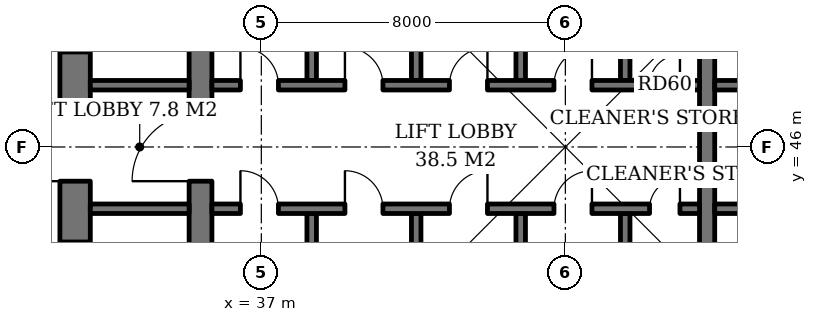
"""IFC4 building model, lengths in metres.
Left out: names, types, materials, properties, quantities, classifications, styles, units other than length and angle.
Written with IfcOpenShell. Run it as: python <this file> out.ifc"""

import sys

from ifc_helpers import new_model, si_unit, direction, frame, frame_2d, origin, place, context, subcontext, project, spatial, rectangle, extrude, element, fill, save


model = new_model("IFC4")
c1 = context("Model", 3, precision=1e-05, world=origin(), true_north=direction((0.0, 1.0)))
c2 = subcontext(c1, "Body", "Model", "MODEL_VIEW")
j1 = project(units=[si_unit("LENGTHUNIT", "METRE"), si_unit("PLANEANGLEUNIT", "RADIAN")], contexts=[c1])
p1 = place(None, origin())
s1 = spatial("IfcSite", under=j1, at=p1, CompositionType="ELEMENT")
p2 = place(p1, origin())
s2 = spatial("IfcBuilding", under=s1, at=p2, CompositionType="ELEMENT")
p3 = place(p2, frame((0.0, 0.0, -10.0)))
s3 = spatial("IfcBuildingStorey", under=s2, at=p3, CompositionType="ELEMENT", Elevation=-10.0)
p4 = place(p3, frame((35.4, 36.7, 0.0), z_axis=(0.0, 0.0, 1.0), x_axis=(0.0, 1.0, 0.0)))
e1 = element("IfcWall", 1, at=p4, inside=s3, PredefinedType="SHEAR", context=c2, shape_type="SweptSolid", body=[
    extrude(rectangle(XDim=18.6, YDim=0.6, at=frame_2d((9.3, 0.0))), origin(), (0.0, 0.0, 1.0), 5.0),
])
p5 = place(p4, frame((8.4, 0.0, 0.0)))
e2 = element("IfcOpeningElement", 2, at=p5, cuts=e1, PredefinedType="OPENING", context=c2, shape_type="SweptSolid", body=[
    extrude(rectangle(XDim=1.8, YDim=2.4, at=frame_2d((0.9, 1.2))), frame((0.0, 0.31, 0.0), z_axis=(0.0, -1.0, 0.0), x_axis=(1.0, 0.0, 0.0)), (0.0, 0.0, 1.0), 0.62),
])
p6 = place(p3, frame((32.1, 33.5, 0.0), z_axis=(0.0, 0.0, 1.0), x_axis=(0.0, 1.0, 0.0)))
e3 = element("IfcWall", 3, at=p6, inside=s3, PredefinedType="SHEAR", context=c2, shape_type="SweptSolid", body=[
    extrude(rectangle(XDim=25.0, YDim=0.8, at=frame_2d((12.5, 0.0))), origin(), (0.0, 0.0, 1.0), 5.0),
])
p7 = place(p6, frame((11.6, 0.0, 0.0)))
e4 = element("IfcOpeningElement", 4, at=p7, cuts=e3, PredefinedType="OPENING", context=c2, shape_type="SweptSolid", body=[
    extrude(rectangle(XDim=1.8, YDim=2.4, at=frame_2d((0.9, 1.2))), frame((0.0, 0.41, 0.0), z_axis=(0.0, -1.0, 0.0), x_axis=(1.0, 0.0, 0.0)), (0.0, 0.0, 1.0), 0.82),
])
p8 = place(p6, frame((3.5, 0.0, 0.0)))
e5 = element("IfcOpeningElement", 5, at=p8, cuts=e3, PredefinedType="OPENING", context=c2, shape_type="SweptSolid", body=[
    extrude(rectangle(XDim=1.0, YDim=2.1, at=frame_2d((0.5, 1.05))), frame((0.0, 0.41, 0.0), z_axis=(0.0, -1.0, 0.0), x_axis=(1.0, 0.0, 0.0)), (0.0, 0.0, 1.0), 0.82),
])
p9 = place(p6, frame((6.25, 0.0, 0.0)))
e6 = element("IfcOpeningElement", 6, at=p9, cuts=e3, PredefinedType="OPENING", context=c2, shape_type="SweptSolid", body=[
    extrude(rectangle(XDim=1.0, YDim=2.1, at=frame_2d((0.5, 1.05))), frame((0.0, 0.41, 0.0), z_axis=(0.0, -1.0, 0.0), x_axis=(1.0, 0.0, 0.0)), (0.0, 0.0, 1.0), 0.82),
])
p10 = place(p6, frame((9.0, 0.0, 0.0)))
e7 = element("IfcOpeningElement", 7, at=p10, cuts=e3, PredefinedType="OPENING", context=c2, shape_type="SweptSolid", body=[
    extrude(rectangle(XDim=1.0, YDim=2.1, at=frame_2d((0.5, 1.05))), frame((0.0, 0.41, 0.0), z_axis=(0.0, -1.0, 0.0), x_axis=(1.0, 0.0, 0.0)), (0.0, 0.0, 1.0), 0.82),
])
p11 = place(p6, frame((15.0, 0.0, 0.0)))
e8 = element("IfcOpeningElement", 8, at=p11, cuts=e3, PredefinedType="OPENING", context=c2, shape_type="SweptSolid", body=[
    extrude(rectangle(XDim=1.0, YDim=2.1, at=frame_2d((0.5, 1.05))), frame((0.0, 0.41, 0.0), z_axis=(0.0, -1.0, 0.0), x_axis=(1.0, 0.0, 0.0)), (0.0, 0.0, 1.0), 0.82),
])
p12 = place(p6, frame((17.75, 0.0, 0.0)))
e9 = element("IfcOpeningElement", 9, at=p12, cuts=e3, PredefinedType="OPENING", context=c2, shape_type="SweptSolid", body=[
    extrude(rectangle(XDim=1.0, YDim=2.1, at=frame_2d((0.5, 1.05))), frame((0.0, 0.41, 0.0), z_axis=(0.0, -1.0, 0.0), x_axis=(1.0, 0.0, 0.0)), (0.0, 0.0, 1.0), 0.82),
])
p13 = place(p3, frame((48.73, 40.0, 0.0), z_axis=(0.0, 0.0, 1.0), x_axis=(0.0, 1.0, 0.0)))
e10 = element("IfcWall", 10, at=p13, inside=s3, PredefinedType="SHEAR", context=c2, shape_type="SweptSolid", body=[
    extrude(rectangle(XDim=12.0, YDim=0.4, at=frame_2d((6.0, 0.0))), origin(), (0.0, 0.0, 1.0), 5.0),
])
for number, where, z_axis, x_axis in (
    (11, (38.325, 47.75, 0.0), (0.0, 0.0, 1.0), (0.0, 1.0, 0.0)),
    (12, (41.075, 47.75, 0.0), (0.0, 0.0, 1.0), (0.0, 1.0, 0.0)),
    (13, (43.825, 47.75, 0.0), (0.0, 0.0, 1.0), (0.0, 1.0, 0.0)),
    (14, (46.575, 47.75, 0.0), (0.0, 0.0, 1.0), (0.0, 1.0, 0.0)),
):
    element("IfcWall", number, at=place(p3, frame(where, z_axis=z_axis, x_axis=x_axis)), inside=s3, PredefinedType="SHEAR", context=c2, shape_type="SweptSolid", body=[
        extrude(rectangle(XDim=2.6, YDim=0.25, at=frame_2d((1.3, 0.0))), origin(), (0.0, 0.0, 1.0), 5.0),
    ])
p14 = place(p3, frame((35.7, 47.625, 0.0), z_axis=(0.0, 0.0, 1.0), x_axis=(1.0, 0.0, 0.0)))
e15 = element("IfcWall", 15, at=p14, inside=s3, PredefinedType="SHEAR", context=c2, shape_type="SweptSolid", body=[
    extrude(rectangle(XDim=12.83, YDim=0.25, at=frame_2d((6.415, 0.0))), origin(), (0.0, 0.0, 1.0), 5.0),
])
p15 = place(p14, frame((0.75, 0.0, 0.0)))
e16 = element("IfcOpeningElement", 16, at=p15, cuts=e15, PredefinedType="OPENING", context=c2, shape_type="SweptSolid", body=[
    extrude(rectangle(XDim=1.0, YDim=2.1, at=frame_2d((0.5, 1.05))), frame((0.0, 0.135, 0.0), z_axis=(0.0, -1.0, 0.0), x_axis=(1.0, 0.0, 0.0)), (0.0, 0.0, 1.0), 0.27),
])
p16 = place(p14, frame((3.5, 0.0, 0.0)))
e17 = element("IfcOpeningElement", 17, at=p16, cuts=e15, PredefinedType="OPENING", context=c2, shape_type="SweptSolid", body=[
    extrude(rectangle(XDim=1.0, YDim=2.1, at=frame_2d((0.5, 1.05))), frame((0.0, 0.135, 0.0), z_axis=(0.0, -1.0, 0.0), x_axis=(1.0, 0.0, 0.0)), (0.0, 0.0, 1.0), 0.27),
])
p17 = place(p14, frame((6.25, 0.0, 0.0)))
e18 = element("IfcOpeningElement", 18, at=p17, cuts=e15, PredefinedType="OPENING", context=c2, shape_type="SweptSolid", body=[
    extrude(rectangle(XDim=1.0, YDim=2.1, at=frame_2d((0.5, 1.05))), frame((0.0, 0.135, 0.0), z_axis=(0.0, -1.0, 0.0), x_axis=(1.0, 0.0, 0.0)), (0.0, 0.0, 1.0), 0.27),
])
p18 = place(p14, frame((9.0, 0.0, 0.0)))
e19 = element("IfcOpeningElement", 19, at=p18, cuts=e15, PredefinedType="OPENING", context=c2, shape_type="SweptSolid", body=[
    extrude(rectangle(XDim=1.0, YDim=2.1, at=frame_2d((0.5, 1.05))), frame((0.0, 0.135, 0.0), z_axis=(0.0, -1.0, 0.0), x_axis=(1.0, 0.0, 0.0)), (0.0, 0.0, 1.0), 0.27),
])
p19 = place(p14, frame((11.515, 0.0, 0.0)))
e20 = element("IfcOpeningElement", 20, at=p19, cuts=e15, PredefinedType="OPENING", context=c2, shape_type="SweptSolid", body=[
    extrude(rectangle(XDim=0.8, YDim=2.0, at=frame_2d((0.4, 1.0))), frame((0.0, 0.135, 0.0), z_axis=(0.0, -1.0, 0.0), x_axis=(1.0, 0.0, 0.0)), (0.0, 0.0, 1.0), 0.27),
])
for number, where, z_axis, x_axis in (
    (21, (38.325, 44.25, 0.0), (0.0, 0.0, 1.0), (0.0, -1.0, 0.0)),
    (22, (41.075, 44.25, 0.0), (0.0, 0.0, 1.0), (0.0, -1.0, 0.0)),
    (23, (43.825, 44.25, 0.0), (0.0, 0.0, 1.0), (0.0, -1.0, 0.0)),
    (24, (46.575, 44.25, 0.0), (0.0, 0.0, 1.0), (0.0, -1.0, 0.0)),
):
    element("IfcWall", number, at=place(p3, frame(where, z_axis=z_axis, x_axis=x_axis)), inside=s3, PredefinedType="SHEAR", context=c2, shape_type="SweptSolid", body=[
        extrude(rectangle(XDim=2.6, YDim=0.25, at=frame_2d((1.3, 0.0))), origin(), (0.0, 0.0, 1.0), 5.0),
    ])
p20 = place(p3, frame((35.7, 44.375, 0.0), z_axis=(0.0, 0.0, 1.0), x_axis=(1.0, 0.0, 0.0)))
e25 = element("IfcWall", 25, at=p20, inside=s3, PredefinedType="SHEAR", context=c2, shape_type="SweptSolid", body=[
    extrude(rectangle(XDim=12.83, YDim=0.25, at=frame_2d((6.415, 0.0))), origin(), (0.0, 0.0, 1.0), 5.0),
])
p21 = place(p20, frame((0.75, 0.0, 0.0)))
e26 = element("IfcOpeningElement", 26, at=p21, cuts=e25, PredefinedType="OPENING", context=c2, shape_type="SweptSolid", body=[
    extrude(rectangle(XDim=1.0, YDim=2.1, at=frame_2d((0.5, 1.05))), frame((0.0, 0.135, 0.0), z_axis=(0.0, -1.0, 0.0), x_axis=(1.0, 0.0, 0.0)), (0.0, 0.0, 1.0), 0.27),
])
p22 = place(p20, frame((3.5, 0.0, 0.0)))
e27 = element("IfcOpeningElement", 27, at=p22, cuts=e25, PredefinedType="OPENING", context=c2, shape_type="SweptSolid", body=[
    extrude(rectangle(XDim=1.0, YDim=2.1, at=frame_2d((0.5, 1.05))), frame((0.0, 0.135, 0.0), z_axis=(0.0, -1.0, 0.0), x_axis=(1.0, 0.0, 0.0)), (0.0, 0.0, 1.0), 0.27),
])
p23 = place(p20, frame((6.25, 0.0, 0.0)))
e28 = element("IfcOpeningElement", 28, at=p23, cuts=e25, PredefinedType="OPENING", context=c2, shape_type="SweptSolid", body=[
    extrude(rectangle(XDim=1.0, YDim=2.1, at=frame_2d((0.5, 1.05))), frame((0.0, 0.135, 0.0), z_axis=(0.0, -1.0, 0.0), x_axis=(1.0, 0.0, 0.0)), (0.0, 0.0, 1.0), 0.27),
])
p24 = place(p20, frame((9.0, 0.0, 0.0)))
e29 = element("IfcOpeningElement", 29, at=p24, cuts=e25, PredefinedType="OPENING", context=c2, shape_type="SweptSolid", body=[
    extrude(rectangle(XDim=1.0, YDim=2.1, at=frame_2d((0.5, 1.05))), frame((0.0, 0.135, 0.0), z_axis=(0.0, -1.0, 0.0), x_axis=(1.0, 0.0, 0.0)), (0.0, 0.0, 1.0), 0.27),
])
p25 = place(p20, frame((11.515, 0.0, 0.0)))
e30 = element("IfcOpeningElement", 30, at=p25, cuts=e25, PredefinedType="OPENING", context=c2, shape_type="SweptSolid", body=[
    extrude(rectangle(XDim=0.8, YDim=2.0, at=frame_2d((0.4, 1.0))), frame((0.0, 0.135, 0.0), z_axis=(0.0, -1.0, 0.0), x_axis=(1.0, 0.0, 0.0)), (0.0, 0.0, 1.0), 0.27),
])
p26 = place(p3, frame((48.93, 47.625, 0.0), z_axis=(0.0, 0.0, 1.0), x_axis=(1.0, 0.0, 0.0)))
e31 = element("IfcWall", 31, at=p26, inside=s3, PredefinedType="SHEAR", context=c2, shape_type="SweptSolid", body=[
    extrude(rectangle(XDim=5.37, YDim=0.25, at=frame_2d((2.685, 0.0))), origin(), (0.0, 0.0, 1.0), 5.0),
])
p27 = place(p26, frame((0.78, 0.0, 0.0)))
e32 = element("IfcOpeningElement", 32, at=p27, cuts=e31, PredefinedType="OPENING", context=c2, shape_type="SweptSolid", body=[
    extrude(rectangle(XDim=1.0, YDim=2.1, at=frame_2d((0.5, 1.05))), frame((0.0, 0.135, 0.0), z_axis=(0.0, -1.0, 0.0), x_axis=(1.0, 0.0, 0.0)), (0.0, 0.0, 1.0), 0.27),
])
p28 = place(p26, frame((3.59, 0.0, 0.0)))
e33 = element("IfcOpeningElement", 33, at=p28, cuts=e31, PredefinedType="OPENING", context=c2, shape_type="SweptSolid", body=[
    extrude(rectangle(XDim=1.0, YDim=2.1, at=frame_2d((0.5, 1.05))), frame((0.0, 0.135, 0.0), z_axis=(0.0, -1.0, 0.0), x_axis=(1.0, 0.0, 0.0)), (0.0, 0.0, 1.0), 0.27),
])
p29 = place(p3, frame((48.93, 44.375, 0.0), z_axis=(0.0, 0.0, 1.0), x_axis=(1.0, 0.0, 0.0)))
e34 = element("IfcWall", 34, at=p29, inside=s3, PredefinedType="SHEAR", context=c2, shape_type="SweptSolid", body=[
    extrude(rectangle(XDim=5.37, YDim=0.25, at=frame_2d((2.685, 0.0))), origin(), (0.0, 0.0, 1.0), 5.0),
])
p30 = place(p29, frame((0.78, 0.0, 0.0)))
e35 = element("IfcOpeningElement", 35, at=p30, cuts=e34, PredefinedType="OPENING", context=c2, shape_type="SweptSolid", body=[
    extrude(rectangle(XDim=1.0, YDim=2.1, at=frame_2d((0.5, 1.05))), frame((0.0, 0.135, 0.0), z_axis=(0.0, -1.0, 0.0), x_axis=(1.0, 0.0, 0.0)), (0.0, 0.0, 1.0), 0.27),
])
p31 = place(p29, frame((3.59, 0.0, 0.0)))
e36 = element("IfcOpeningElement", 36, at=p31, cuts=e34, PredefinedType="OPENING", context=c2, shape_type="SweptSolid", body=[
    extrude(rectangle(XDim=1.0, YDim=2.1, at=frame_2d((0.5, 1.05))), frame((0.0, 0.135, 0.0), z_axis=(0.0, -1.0, 0.0), x_axis=(1.0, 0.0, 0.0)), (0.0, 0.0, 1.0), 0.27),
])
for number, where, z_axis, x_axis in (
    (37, (32.5, 44.375, 0.0), (0.0, 0.0, 1.0), (1.0, 0.0, 0.0)),
    (38, (32.5, 47.625, 0.0), (0.0, 0.0, 1.0), (1.0, 0.0, 0.0)),
):
    element("IfcWall", number, at=place(p3, frame(where, z_axis=z_axis, x_axis=x_axis)), inside=s3, PredefinedType="SHEAR", context=c2, shape_type="SweptSolid", body=[
        extrude(rectangle(XDim=2.6, YDim=0.25, at=frame_2d((1.3, 0.0))), origin(), (0.0, 0.0, 1.0), 5.0),
    ])
p32 = place(p15, origin())
e39 = element("IfcDoor", 39, at=p32, inside=s3, OperationType="SINGLE_SWING_LEFT", PredefinedType="DOOR", context=c2, shape_type="SweptSolid", body=[
    extrude(rectangle(XDim=1.0, YDim=2.1, at=frame_2d((0.5, 1.05))), frame((0.0, 0.025, 0.0), z_axis=(0.0, -1.0, 0.0), x_axis=(1.0, 0.0, 0.0)), (0.0, 0.0, 1.0), 0.05),
])
fill(e16, e39)
p33 = place(p16, origin())
e40 = element("IfcDoor", 40, at=p33, inside=s3, OperationType="SINGLE_SWING_LEFT", PredefinedType="DOOR", context=c2, shape_type="SweptSolid", body=[
    extrude(rectangle(XDim=1.0, YDim=2.1, at=frame_2d((0.5, 1.05))), frame((0.0, 0.025, 0.0), z_axis=(0.0, -1.0, 0.0), x_axis=(1.0, 0.0, 0.0)), (0.0, 0.0, 1.0), 0.05),
])
fill(e17, e40)
p34 = place(p17, origin())
e41 = element("IfcDoor", 41, at=p34, inside=s3, OperationType="SINGLE_SWING_RIGHT", PredefinedType="DOOR", context=c2, shape_type="SweptSolid", body=[
    extrude(rectangle(XDim=1.0, YDim=2.1, at=frame_2d((0.5, 1.05))), frame((0.0, 0.025, 0.0), z_axis=(0.0, -1.0, 0.0), x_axis=(1.0, 0.0, 0.0)), (0.0, 0.0, 1.0), 0.05),
])
fill(e18, e41)
p35 = place(p18, origin())
e42 = element("IfcDoor", 42, at=p35, inside=s3, OperationType="SINGLE_SWING_RIGHT", PredefinedType="DOOR", context=c2, shape_type="SweptSolid", body=[
    extrude(rectangle(XDim=1.0, YDim=2.1, at=frame_2d((0.5, 1.05))), frame((0.0, 0.025, 0.0), z_axis=(0.0, -1.0, 0.0), x_axis=(1.0, 0.0, 0.0)), (0.0, 0.0, 1.0), 0.05),
])
fill(e19, e42)
p36 = place(p19, origin())
e43 = element("IfcDoor", 43, at=p36, inside=s3, OperationType="SINGLE_SWING_RIGHT", PredefinedType="DOOR", context=c2, shape_type="SweptSolid", body=[
    extrude(rectangle(XDim=0.8, YDim=2.0, at=frame_2d((0.4, 1.0))), frame((0.0, 0.025, 0.0), z_axis=(0.0, -1.0, 0.0), x_axis=(1.0, 0.0, 0.0)), (0.0, 0.0, 1.0), 0.05),
])
fill(e20, e43)
p37 = place(p21, origin())
e44 = element("IfcDoor", 44, at=p37, inside=s3, OperationType="SINGLE_SWING_LEFT", PredefinedType="DOOR", context=c2, shape_type="SweptSolid", body=[
    extrude(rectangle(XDim=1.0, YDim=2.1, at=frame_2d((0.5, 1.05))), frame((0.0, 0.025, 0.0), z_axis=(0.0, -1.0, 0.0), x_axis=(1.0, 0.0, 0.0)), (0.0, 0.0, 1.0), 0.05),
])
fill(e26, e44)
p38 = place(p22, origin())
e45 = element("IfcDoor", 45, at=p38, inside=s3, OperationType="SINGLE_SWING_LEFT", PredefinedType="DOOR", context=c2, shape_type="SweptSolid", body=[
    extrude(rectangle(XDim=1.0, YDim=2.1, at=frame_2d((0.5, 1.05))), frame((0.0, 0.025, 0.0), z_axis=(0.0, -1.0, 0.0), x_axis=(1.0, 0.0, 0.0)), (0.0, 0.0, 1.0), 0.05),
])
fill(e27, e45)
p39 = place(p23, origin())
e46 = element("IfcDoor", 46, at=p39, inside=s3, OperationType="SINGLE_SWING_RIGHT", PredefinedType="DOOR", context=c2, shape_type="SweptSolid", body=[
    extrude(rectangle(XDim=1.0, YDim=2.1, at=frame_2d((0.5, 1.05))), frame((0.0, 0.025, 0.0), z_axis=(0.0, -1.0, 0.0), x_axis=(1.0, 0.0, 0.0)), (0.0, 0.0, 1.0), 0.05),
])
fill(e28, e46)
p40 = place(p24, origin())
e47 = element("IfcDoor", 47, at=p40, inside=s3, OperationType="SINGLE_SWING_RIGHT", PredefinedType="DOOR", context=c2, shape_type="SweptSolid", body=[
    extrude(rectangle(XDim=1.0, YDim=2.1, at=frame_2d((0.5, 1.05))), frame((0.0, 0.025, 0.0), z_axis=(0.0, -1.0, 0.0), x_axis=(1.0, 0.0, 0.0)), (0.0, 0.0, 1.0), 0.05),
])
fill(e29, e47)
p41 = place(p25, origin())
e48 = element("IfcDoor", 48, at=p41, inside=s3, OperationType="SINGLE_SWING_RIGHT", PredefinedType="DOOR", context=c2, shape_type="SweptSolid", body=[
    extrude(rectangle(XDim=0.8, YDim=2.0, at=frame_2d((0.4, 1.0))), frame((0.0, 0.025, 0.0), z_axis=(0.0, -1.0, 0.0), x_axis=(1.0, 0.0, 0.0)), (0.0, 0.0, 1.0), 0.05),
])
fill(e30, e48)
p42 = place(p5, origin())
e49 = element("IfcDoor", 49, at=p42, inside=s3, OperationType="DOUBLE_DOOR_SINGLE_SWING", PredefinedType="DOOR", context=c2, shape_type="SweptSolid", body=[
    extrude(rectangle(XDim=1.8, YDim=2.4, at=frame_2d((0.9, 1.2))), frame((0.0, 0.025, 0.0), z_axis=(0.0, -1.0, 0.0), x_axis=(1.0, 0.0, 0.0)), (0.0, 0.0, 1.0), 0.05),
])
fill(e2, e49)
p43 = place(p7, origin())
e50 = element("IfcDoor", 50, at=p43, inside=s3, OperationType="DOUBLE_DOOR_SINGLE_SWING", PredefinedType="DOOR", context=c2, shape_type="SweptSolid", body=[
    extrude(rectangle(XDim=1.8, YDim=2.4, at=frame_2d((0.9, 1.2))), frame((0.0, 0.025, 0.0), z_axis=(0.0, -1.0, 0.0), x_axis=(1.0, 0.0, 0.0)), (0.0, 0.0, 1.0), 0.05),
])
fill(e4, e50)
save(model, sys.argv[1])
